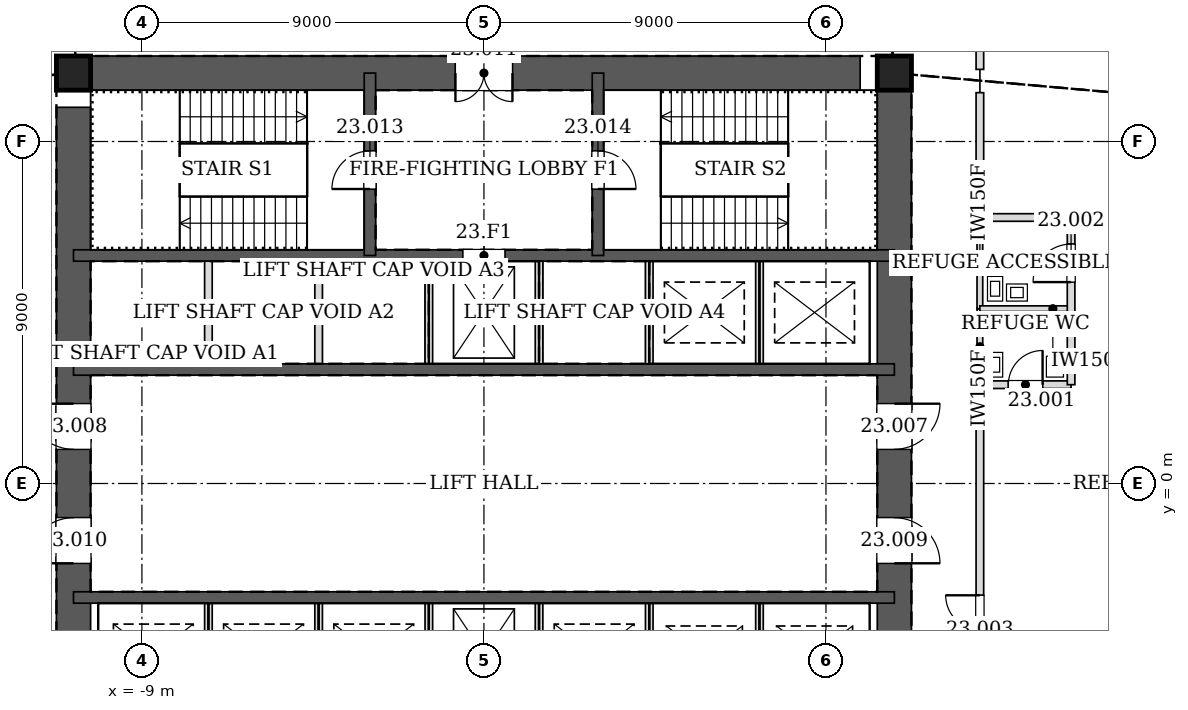
"""IFC4 building model, lengths in metres.
Left out: names, types, materials, properties, quantities, classifications, styles, units other than length and angle.
Written with IfcOpenShell. Run it as: python <this file> out.ifc"""

import sys

from ifc_helpers import new_model, si_unit, direction, frame, frame_2d, origin, origin_2d, place, context, subcontext, project, spatial, rectangle, hollow_rectangle, extrude, element, fill, save


model = new_model("IFC4")
c1 = context("Model", 3, precision=1e-05, world=origin(), true_north=direction((0.0, 1.0)))
c2 = subcontext(c1, "Body", "Model", "MODEL_VIEW")
j1 = project(units=[si_unit("LENGTHUNIT", "METRE"), si_unit("PLANEANGLEUNIT", "RADIAN")], contexts=[c1])
p1 = place(None, origin())
s1 = spatial("IfcSite", under=j1, at=p1, CompositionType="ELEMENT")
p2 = place(p1, origin())
s2 = spatial("IfcBuilding", under=s1, at=p2, CompositionType="ELEMENT")
p3 = place(p2, frame((0.0, 0.0, 104.4)))
s3 = spatial("IfcBuildingStorey", under=s2, at=p3, CompositionType="ELEMENT", Elevation=104.4)
for number, where, z_axis, x_axis in (
    (1, (10.8, 10.8, 0.0), (0.0, 0.0, 1.0), (1.0, 0.0, 0.0)),
    (2, (-10.8, 10.8, 0.0), (0.0, 0.0, 1.0), (1.0, 0.0, 0.0)),
):
    element("IfcColumn", number, at=place(p3, frame(where, z_axis=z_axis, x_axis=x_axis)), inside=s3, PredefinedType="COLUMN", context=c2, shape_type="SweptSolid", body=[
        extrude(hollow_rectangle(XDim=0.9, YDim=0.9, WallThickness=0.06, at=origin_2d()), origin(), (0.0, 0.0, 1.0), 4.5),
    ])
p4 = place(p3, frame((10.8, -10.8, 0.0), z_axis=(0.0, 0.0, 1.0), x_axis=(0.0, 1.0, 0.0)))
e3 = element("IfcWall", 3, at=p4, inside=s3, PredefinedType="SOLIDWALL", context=c2, shape_type="SweptSolid", body=[
    extrude(rectangle(XDim=21.6, YDim=0.9, at=frame_2d((10.8, 0.0))), origin(), (0.0, 0.0, 1.0), 4.5),
])
p5 = place(p4, frame((11.7, 0.0, 0.0)))
e4 = element("IfcOpeningElement", 4, at=p5, cuts=e3, PredefinedType="OPENING", context=c2, shape_type="SweptSolid", body=[
    extrude(rectangle(XDim=1.2, YDim=2.1, at=frame_2d((0.6, 1.05))), frame((0.0, 0.46, 0.0), z_axis=(0.0, -1.0, 0.0), x_axis=(1.0, 0.0, 0.0)), (0.0, 0.0, 1.0), 0.92),
])
p6 = place(p4, frame((8.7, 0.0, 0.0)))
e5 = element("IfcOpeningElement", 5, at=p6, cuts=e3, PredefinedType="OPENING", context=c2, shape_type="SweptSolid", body=[
    extrude(rectangle(XDim=1.2, YDim=2.1, at=frame_2d((0.6, 1.05))), frame((0.0, 0.46, 0.0), z_axis=(0.0, -1.0, 0.0), x_axis=(1.0, 0.0, 0.0)), (0.0, 0.0, 1.0), 0.92),
])
p7 = place(p3, frame((10.8, 10.8, 0.0), z_axis=(0.0, 0.0, 1.0), x_axis=(-1.0, 0.0, 0.0)))
e6 = element("IfcWall", 6, at=p7, inside=s3, PredefinedType="SOLIDWALL", context=c2, shape_type="SweptSolid", body=[
    extrude(rectangle(XDim=21.6, YDim=0.9, at=frame_2d((10.8, 0.0))), origin(), (0.0, 0.0, 1.0), 4.5),
])
p8 = place(p7, frame((10.05, 0.0, 0.0)))
e7 = element("IfcOpeningElement", 7, at=p8, cuts=e6, PredefinedType="OPENING", context=c2, shape_type="SweptSolid", body=[
    extrude(rectangle(XDim=1.5, YDim=2.1, at=frame_2d((0.75, 1.05))), frame((0.0, 0.46, 0.0), z_axis=(0.0, -1.0, 0.0), x_axis=(1.0, 0.0, 0.0)), (0.0, 0.0, 1.0), 0.92),
])
p9 = place(p3, frame((-10.8, 10.8, 0.0), z_axis=(0.0, 0.0, 1.0), x_axis=(0.0, -1.0, 0.0)))
e8 = element("IfcWall", 8, at=p9, inside=s3, PredefinedType="SOLIDWALL", context=c2, shape_type="SweptSolid", body=[
    extrude(rectangle(XDim=21.6, YDim=0.9, at=frame_2d((10.8, 0.0))), origin(), (0.0, 0.0, 1.0), 4.5),
])
p10 = place(p9, frame((8.7, 0.0, 0.0)))
e9 = element("IfcOpeningElement", 9, at=p10, cuts=e8, PredefinedType="OPENING", context=c2, shape_type="SweptSolid", body=[
    extrude(rectangle(XDim=1.2, YDim=2.1, at=frame_2d((0.6, 1.05))), frame((0.0, 0.46, 0.0), z_axis=(0.0, -1.0, 0.0), x_axis=(1.0, 0.0, 0.0)), (0.0, 0.0, 1.0), 0.92),
])
p11 = place(p9, frame((11.7, 0.0, 0.0)))
e10 = element("IfcOpeningElement", 10, at=p11, cuts=e8, PredefinedType="OPENING", context=c2, shape_type="SweptSolid", body=[
    extrude(rectangle(XDim=1.2, YDim=2.1, at=frame_2d((0.6, 1.05))), frame((0.0, 0.46, 0.0), z_axis=(0.0, -1.0, 0.0), x_axis=(1.0, 0.0, 0.0)), (0.0, 0.0, 1.0), 0.92),
])
p12 = place(p3, frame((-10.8, 3.0, 0.0), z_axis=(0.0, 0.0, 1.0), x_axis=(1.0, 0.0, 0.0)))
e11 = element("IfcWall", 11, at=p12, inside=s3, PredefinedType="SOLIDWALL", context=c2, shape_type="SweptSolid", body=[
    extrude(rectangle(XDim=21.6, YDim=0.3, at=frame_2d((10.8, 0.0))), origin(), (0.0, 0.0, 1.0), 4.5),
])
p13 = place(p3, frame((-10.8, 6.0, 0.0), z_axis=(0.0, 0.0, 1.0), x_axis=(1.0, 0.0, 0.0)))
e12 = element("IfcWall", 12, at=p13, inside=s3, PredefinedType="SOLIDWALL", context=c2, shape_type="SweptSolid", body=[
    extrude(rectangle(XDim=21.6, YDim=0.3, at=frame_2d((10.8, 0.0))), origin(), (0.0, 0.0, 1.0), 4.5),
])
p14 = place(p13, frame((10.25, 0.0, 0.0)))
e13 = element("IfcOpeningElement", 13, at=p14, cuts=e12, PredefinedType="OPENING", context=c2, shape_type="SweptSolid", body=[
    extrude(rectangle(XDim=1.1, YDim=2.1, at=frame_2d((0.55, 1.05))), frame((0.0, 0.16, 0.0), z_axis=(0.0, -1.0, 0.0), x_axis=(1.0, 0.0, 0.0)), (0.0, 0.0, 1.0), 0.32),
])
p15 = place(p3, frame((-3.0, 6.0, 0.0), z_axis=(0.0, 0.0, 1.0), x_axis=(0.0, 1.0, 0.0)))
e14 = element("IfcWall", 14, at=p15, inside=s3, PredefinedType="SOLIDWALL", context=c2, shape_type="SweptSolid", body=[
    extrude(rectangle(XDim=4.8, YDim=0.3, at=frame_2d((2.4, 0.0))), origin(), (0.0, 0.0, 1.0), 4.5),
])
p16 = place(p15, frame((1.75, 0.0, 0.0)))
e15 = element("IfcOpeningElement", 15, at=p16, cuts=e14, PredefinedType="OPENING", context=c2, shape_type="SweptSolid", body=[
    extrude(rectangle(XDim=1.0, YDim=2.1, at=frame_2d((0.5, 1.05))), frame((0.0, 0.16, 0.0), z_axis=(0.0, -1.0, 0.0), x_axis=(1.0, 0.0, 0.0)), (0.0, 0.0, 1.0), 0.32),
])
p17 = place(p3, frame((3.0, 6.0, 0.0), z_axis=(0.0, 0.0, 1.0), x_axis=(0.0, 1.0, 0.0)))
e16 = element("IfcWall", 16, at=p17, inside=s3, PredefinedType="SOLIDWALL", context=c2, shape_type="SweptSolid", body=[
    extrude(rectangle(XDim=4.8, YDim=0.3, at=frame_2d((2.4, 0.0))), origin(), (0.0, 0.0, 1.0), 4.5),
])
p18 = place(p17, frame((1.75, 0.0, 0.0)))
e17 = element("IfcOpeningElement", 17, at=p18, cuts=e16, PredefinedType="OPENING", context=c2, shape_type="SweptSolid", body=[
    extrude(rectangle(XDim=1.0, YDim=2.1, at=frame_2d((0.5, 1.05))), frame((0.0, 0.16, 0.0), z_axis=(0.0, -1.0, 0.0), x_axis=(1.0, 0.0, 0.0)), (0.0, 0.0, 1.0), 0.32),
])
p19 = place(p3, frame((-10.8, -3.0, 0.0), z_axis=(0.0, 0.0, 1.0), x_axis=(1.0, 0.0, 0.0)))
e18 = element("IfcWall", 18, at=p19, inside=s3, PredefinedType="SOLIDWALL", context=c2, shape_type="SweptSolid", body=[
    extrude(rectangle(XDim=21.6, YDim=0.3, at=frame_2d((10.8, 0.0))), origin(), (0.0, 0.0, 1.0), 4.5),
])
p20 = place(p3, frame((13.05, 2.599, 0.0), z_axis=(0.0, 0.0, 1.0), x_axis=(0.0, 1.0, 0.0)))
e19 = element("IfcWall", 19, at=p20, inside=s3, PredefinedType="PARTITIONING", context=c2, shape_type="SweptSolid", body=[
    extrude(rectangle(XDim=2.002, YDim=0.15, at=frame_2d((1.001, 0.0))), origin(), (0.0, 0.0, 1.0), 4.25),
])
p21 = place(p3, frame((13.05, 4.599, 0.0), z_axis=(0.0, 0.0, 1.0), x_axis=(0.0, 1.0, 0.0)))
e20 = element("IfcWall", 20, at=p21, inside=s3, PredefinedType="PARTITIONING", context=c2, shape_type="SweptSolid", body=[
    extrude(rectangle(XDim=2.402, YDim=0.15, at=frame_2d((1.201, 0.0))), origin(), (0.0, 0.0, 1.0), 4.25),
])
p22 = place(p3, frame((13.05, -10.895, 0.0), z_axis=(0.0, 0.0, 1.0), x_axis=(0.0, 1.0, 0.0)))
e21 = element("IfcWall", 21, at=p22, inside=s3, PredefinedType="PARTITIONING", context=c2, shape_type="SweptSolid", body=[
    extrude(rectangle(XDim=13.496, YDim=0.2, at=frame_2d((6.748, 0.0))), origin(), (0.0, 0.0, 1.0), 2.94),
])
p23 = place(p22, frame((6.153, 0.0, 0.0)))
e22 = element("IfcOpeningElement", 22, at=p23, cuts=e21, PredefinedType="OPENING", context=c2, shape_type="SweptSolid", body=[
    extrude(rectangle(XDim=1.8, YDim=2.4, at=frame_2d((0.9, 1.2))), frame((0.0, 0.11, 0.0), z_axis=(0.0, -1.0, 0.0), x_axis=(1.0, 0.0, 0.0)), (0.0, 0.0, 1.0), 0.22),
])
p24 = place(p3, frame((13.05, 6.999, 0.0), z_axis=(0.0, 0.0, 1.0), x_axis=(0.0, 1.0, 0.0)))
e23 = element("IfcWall", 23, at=p24, inside=s3, PredefinedType="PARTITIONING", context=c2, shape_type="SweptSolid", body=[
    extrude(rectangle(XDim=3.286, YDim=0.2, at=frame_2d((1.643, 0.0))), origin(), (0.0, 0.0, 1.0), 4.25),
])
p25 = place(p3, frame((13.05, 10.897, 0.0), z_axis=(0.0, 0.0, 1.0), x_axis=(0.0, 1.0, 0.0)))
e24 = element("IfcWall", 24, at=p25, inside=s3, PredefinedType="PARTITIONING", context=c2, shape_type="SweptSolid", body=[
    extrude(rectangle(XDim=2.153, YDim=0.2, at=frame_2d((1.076, 0.0))), origin(), (0.0, 0.0, 1.0), 3.199),
])
p26 = place(p3, frame((15.45, 4.6, 0.0), z_axis=(0.0, 0.0, 1.0), x_axis=(-1.0, 0.0, 0.0)))
e25 = element("IfcWall", 25, at=p26, inside=s3, PredefinedType="PARTITIONING", context=c2, shape_type="SweptSolid", body=[
    extrude(rectangle(XDim=2.4, YDim=0.15, at=frame_2d((1.2, 0.0))), origin(), (0.0, 0.0, 1.0), 3.328),
])
p27 = place(p3, frame((13.05, 2.6, 0.0), z_axis=(0.0, 0.0, 1.0), x_axis=(1.0, 0.0, 0.0)))
e26 = element("IfcWall", 26, at=p27, inside=s3, PredefinedType="PARTITIONING", context=c2, shape_type="SweptSolid", body=[
    extrude(rectangle(XDim=2.4, YDim=0.2, at=frame_2d((1.2, 0.0))), origin(), (0.0, 0.0, 1.0), 3.328),
])
p28 = place(p27, frame((0.75, 0.0, 0.0)))
e27 = element("IfcOpeningElement", 27, at=p28, cuts=e26, PredefinedType="OPENING", context=c2, shape_type="SweptSolid", body=[
    extrude(rectangle(XDim=0.9, YDim=2.1, at=frame_2d((0.45, 1.05))), frame((0.0, 0.11, 0.0), z_axis=(0.0, -1.0, 0.0), x_axis=(1.0, 0.0, 0.0)), (0.0, 0.0, 1.0), 0.22),
])
p29 = place(p3, frame((15.45, 2.6, 0.0), z_axis=(0.0, 0.0, 1.0), x_axis=(0.0, 1.0, 0.0)))
e28 = element("IfcWall", 28, at=p29, inside=s3, PredefinedType="PARTITIONING", context=c2, shape_type="SweptSolid", body=[
    extrude(rectangle(XDim=4.4, YDim=0.2, at=frame_2d((2.2, 0.0))), origin(), (0.0, 0.0, 1.0), 4.25),
])
p30 = place(p29, frame((2.7, 0.0, 0.0)))
e29 = element("IfcOpeningElement", 29, at=p30, cuts=e28, PredefinedType="OPENING", context=c2, shape_type="SweptSolid", body=[
    extrude(rectangle(XDim=1.0, YDim=2.1, at=frame_2d((0.5, 1.05))), frame((0.0, 0.11, 0.0), z_axis=(0.0, -1.0, 0.0), x_axis=(1.0, 0.0, 0.0)), (0.0, 0.0, 1.0), 0.22),
])
p31 = place(p3, frame((15.45, 7.0, 0.0), z_axis=(0.0, 0.0, 1.0), x_axis=(-1.0, 0.0, 0.0)))
e30 = element("IfcWall", 30, at=p31, inside=s3, PredefinedType="PARTITIONING", context=c2, shape_type="SweptSolid", body=[
    extrude(rectangle(XDim=2.4, YDim=0.2, at=frame_2d((1.2, 0.0))), origin(), (0.0, 0.0, 1.0), 3.328),
])
for number, where, z_axis, x_axis in (
    (31, (-7.25, 3.15, 0.0), (0.0, 0.0, 1.0), (0.0, 1.0, 0.0)),
    (32, (-4.35, 3.15, 0.0), (0.0, 0.0, 1.0), (0.0, 1.0, 0.0)),
    (33, (-1.45, 3.15, 0.0), (0.0, 0.0, 1.0), (0.0, 1.0, 0.0)),
    (34, (1.45, 3.15, 0.0), (0.0, 0.0, 1.0), (0.0, 1.0, 0.0)),
    (35, (4.35, 3.15, 0.0), (0.0, 0.0, 1.0), (0.0, 1.0, 0.0)),
):
    element("IfcWall", number, at=place(p3, frame(where, z_axis=z_axis, x_axis=x_axis)), inside=s3, PredefinedType="PARTITIONING", context=c2, shape_type="SweptSolid", body=[
        extrude(rectangle(XDim=2.7, YDim=0.2, at=frame_2d((1.35, 0.0))), origin(), (0.0, 0.0, 1.0), 4.25),
    ])
for number, where, z_axis, x_axis in (
    (36, (7.25, 3.15, 0.0), (0.0, 0.0, 1.0), (0.0, 1.0, 0.0)),
    (37, (-7.25, -5.85, 0.0), (0.0, 0.0, 1.0), (0.0, 1.0, 0.0)),
    (38, (-4.35, -5.85, 0.0), (0.0, 0.0, 1.0), (0.0, 1.0, 0.0)),
    (39, (-1.45, -5.85, 0.0), (0.0, 0.0, 1.0), (0.0, 1.0, 0.0)),
    (40, (1.45, -5.85, 0.0), (0.0, 0.0, 1.0), (0.0, 1.0, 0.0)),
    (41, (4.35, -5.85, 0.0), (0.0, 0.0, 1.0), (0.0, 1.0, 0.0)),
    (42, (7.25, -5.85, 0.0), (0.0, 0.0, 1.0), (0.0, 1.0, 0.0)),
):
    element("IfcWall", number, at=place(p3, frame(where, z_axis=z_axis, x_axis=x_axis)), inside=s3, PredefinedType="PARTITIONING", context=c2, shape_type="SweptSolid", body=[
        extrude(rectangle(XDim=2.7, YDim=0.2, at=frame_2d((1.35, 0.0))), origin(), (0.0, 0.0, 1.0), 4.5),
    ])
p32 = place(p28, origin())
e43 = element("IfcDoor", 43, at=p32, inside=s3, OperationType="SINGLE_SWING_RIGHT", PredefinedType="DOOR", context=c2, shape_type="SweptSolid", body=[
    extrude(rectangle(XDim=0.9, YDim=2.1, at=frame_2d((0.45, 1.05))), frame((0.0, 0.025, 0.0), z_axis=(0.0, -1.0, 0.0), x_axis=(1.0, 0.0, 0.0)), (0.0, 0.0, 1.0), 0.05),
])
fill(e27, e43)
p33 = place(p30, origin())
e44 = element("IfcDoor", 44, at=p33, inside=s3, OperationType="SINGLE_SWING_LEFT", PredefinedType="DOOR", context=c2, shape_type="SweptSolid", body=[
    extrude(rectangle(XDim=1.0, YDim=2.1, at=frame_2d((0.5, 1.05))), frame((0.0, 0.025, 0.0), z_axis=(0.0, -1.0, 0.0), x_axis=(1.0, 0.0, 0.0)), (0.0, 0.0, 1.0), 0.05),
])
fill(e29, e44)
p34 = place(p23, origin())
e45 = element("IfcDoor", 45, at=p34, inside=s3, OperationType="DOUBLE_DOOR_SINGLE_SWING", PredefinedType="DOOR", context=c2, shape_type="SweptSolid", body=[
    extrude(rectangle(XDim=1.8, YDim=2.4, at=frame_2d((0.9, 1.2))), frame((0.0, 0.025, 0.0), z_axis=(0.0, -1.0, 0.0), x_axis=(1.0, 0.0, 0.0)), (0.0, 0.0, 1.0), 0.05),
])
fill(e22, e45)
p35 = place(p5, frame((1.2, 0.0, 0.0), z_axis=(0.0, 0.0, 1.0), x_axis=(-1.0, 0.0, 0.0)))
e46 = element("IfcDoor", 46, at=p35, inside=s3, OperationType="SINGLE_SWING_LEFT", PredefinedType="DOOR", context=c2, shape_type="SweptSolid", body=[
    extrude(rectangle(XDim=1.2, YDim=2.1, at=frame_2d((0.6, 1.05))), frame((0.0, 0.025, 0.0), z_axis=(0.0, -1.0, 0.0), x_axis=(1.0, 0.0, 0.0)), (0.0, 0.0, 1.0), 0.05),
])
fill(e4, e46)
p36 = place(p10, frame((1.2, 0.0, 0.0), z_axis=(0.0, 0.0, 1.0), x_axis=(-1.0, 0.0, 0.0)))
e47 = element("IfcDoor", 47, at=p36, inside=s3, OperationType="SINGLE_SWING_RIGHT", PredefinedType="DOOR", context=c2, shape_type="SweptSolid", body=[
    extrude(rectangle(XDim=1.2, YDim=2.1, at=frame_2d((0.6, 1.05))), frame((0.0, 0.025, 0.0), z_axis=(0.0, -1.0, 0.0), x_axis=(1.0, 0.0, 0.0)), (0.0, 0.0, 1.0), 0.05),
])
fill(e9, e47)
p37 = place(p6, frame((1.2, 0.0, 0.0), z_axis=(0.0, 0.0, 1.0), x_axis=(-1.0, 0.0, 0.0)))
e48 = element("IfcDoor", 48, at=p37, inside=s3, OperationType="SINGLE_SWING_RIGHT", PredefinedType="DOOR", context=c2, shape_type="SweptSolid", body=[
    extrude(rectangle(XDim=1.2, YDim=2.1, at=frame_2d((0.6, 1.05))), frame((0.0, 0.025, 0.0), z_axis=(0.0, -1.0, 0.0), x_axis=(1.0, 0.0, 0.0)), (0.0, 0.0, 1.0), 0.05),
])
fill(e5, e48)
p38 = place(p11, frame((1.2, 0.0, 0.0), z_axis=(0.0, 0.0, 1.0), x_axis=(-1.0, 0.0, 0.0)))
e49 = element("IfcDoor", 49, at=p38, inside=s3, OperationType="SINGLE_SWING_LEFT", PredefinedType="DOOR", context=c2, shape_type="SweptSolid", body=[
    extrude(rectangle(XDim=1.2, YDim=2.1, at=frame_2d((0.6, 1.05))), frame((0.0, 0.025, 0.0), z_axis=(0.0, -1.0, 0.0), x_axis=(1.0, 0.0, 0.0)), (0.0, 0.0, 1.0), 0.05),
])
fill(e10, e49)
p39 = place(p8, origin())
e50 = element("IfcDoor", 50, at=p39, inside=s3, OperationType="DOUBLE_DOOR_SINGLE_SWING", PredefinedType="DOOR", context=c2, shape_type="SweptSolid", body=[
    extrude(rectangle(XDim=1.5, YDim=2.1, at=frame_2d((0.75, 1.05))), frame((0.0, 0.025, 0.0), z_axis=(0.0, -1.0, 0.0), x_axis=(1.0, 0.0, 0.0)), (0.0, 0.0, 1.0), 0.05),
])
fill(e7, e50)
p40 = place(p16, origin())
e51 = element("IfcDoor", 51, at=p40, inside=s3, OperationType="SINGLE_SWING_LEFT", PredefinedType="DOOR", context=c2, shape_type="SweptSolid", body=[
    extrude(rectangle(XDim=1.0, YDim=2.1, at=frame_2d((0.5, 1.05))), frame((0.0, 0.025, 0.0), z_axis=(0.0, -1.0, 0.0), x_axis=(1.0, 0.0, 0.0)), (0.0, 0.0, 1.0), 0.05),
])
fill(e15, e51)
p41 = place(p18, frame((1.0, 0.0, 0.0), z_axis=(0.0, 0.0, 1.0), x_axis=(-1.0, 0.0, 0.0)))
e52 = element("IfcDoor", 52, at=p41, inside=s3, OperationType="SINGLE_SWING_RIGHT", PredefinedType="DOOR", context=c2, shape_type="SweptSolid", body=[
    extrude(rectangle(XDim=1.0, YDim=2.1, at=frame_2d((0.5, 1.05))), frame((0.0, 0.025, 0.0), z_axis=(0.0, -1.0, 0.0), x_axis=(1.0, 0.0, 0.0)), (0.0, 0.0, 1.0), 0.05),
])
fill(e17, e52)
p42 = place(p14, origin())
e53 = element("IfcDoor", 53, at=p42, inside=s3, OperationType="DOUBLE_DOOR_SLIDING", PredefinedType="DOOR", context=c2, shape_type="SweptSolid", body=[
    extrude(rectangle(XDim=1.1, YDim=2.1, at=frame_2d((0.55, 1.05))), frame((0.0, 0.025, 0.0), z_axis=(0.0, -1.0, 0.0), x_axis=(1.0, 0.0, 0.0)), (0.0, 0.0, 1.0), 0.05),
])
fill(e13, e53)
save(model, sys.argv[1])
